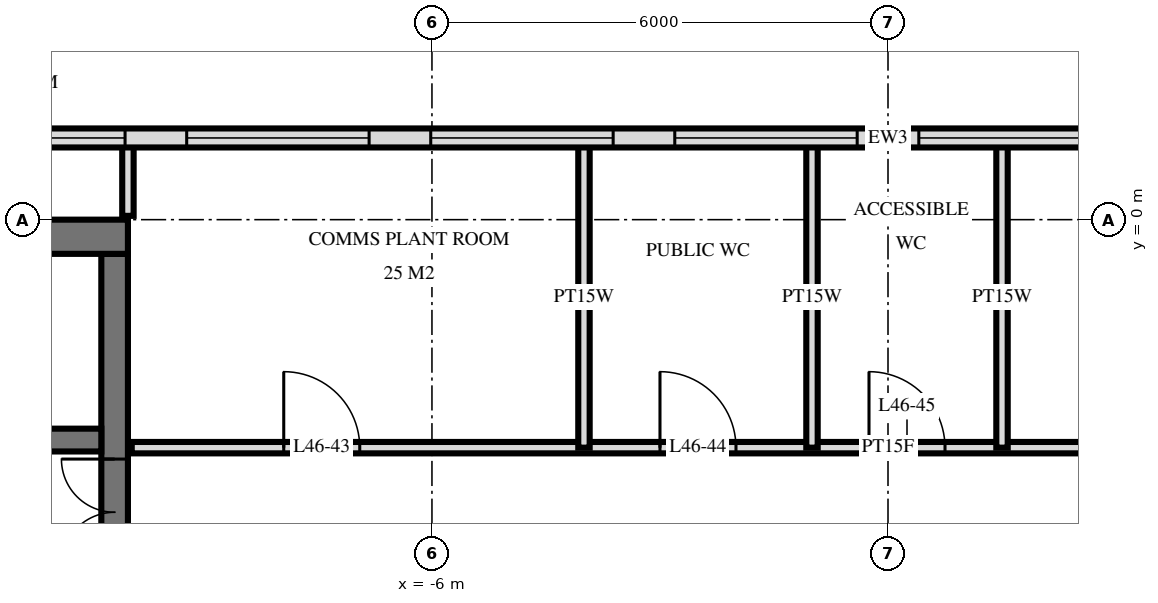
"""IFC4 building model, lengths in metres.
Left out: names, types, materials, properties, quantities, classifications, styles, units other than length and angle.
Written with IfcOpenShell. Run it as: python <this file> out.ifc"""

import sys

from ifc_helpers import new_model, si_unit, direction, frame, frame_2d, origin, place, context, subcontext, project, spatial, rectangle, extrude, element, fill, save


model = new_model("IFC4")
c1 = context("Model", 3, precision=1e-05, world=origin(), true_north=direction((0.0, 1.0)))
c2 = subcontext(c1, "Body", "Model", "MODEL_VIEW")
j1 = project(units=[si_unit("LENGTHUNIT", "METRE"), si_unit("PLANEANGLEUNIT", "RADIAN")], contexts=[c1])
p1 = place(None, origin())
s1 = spatial("IfcSite", under=j1, at=p1, CompositionType="ELEMENT")
p2 = place(p1, origin())
s2 = spatial("IfcBuilding", under=s1, at=p2, CompositionType="ELEMENT")
p3 = place(p2, frame((0.0, 0.0, 177.6)))
s3 = spatial("IfcBuildingStorey", under=s2, at=p3, CompositionType="ELEMENT", Elevation=177.6)
p4 = place(p3, frame((-24.5, -0.225, 0.0), z_axis=(0.0, 0.0, 1.0), x_axis=(1.0, 0.0, 0.0)))
e1 = element("IfcWall", 1, at=p4, inside=s3, PredefinedType="SHEAR", context=c2, shape_type="SweptSolid", body=[
    extrude(rectangle(XDim=14.5, YDim=0.45, at=frame_2d((7.25, 0.0))), origin(), (0.0, 0.0, 1.0), 6.0),
])
p5 = place(p3, frame((-10.175, -14.55, 0.0), z_axis=(0.0, 0.0, 1.0), x_axis=(0.0, 1.0, 0.0)))
e2 = element("IfcWall", 2, at=p5, inside=s3, PredefinedType="SHEAR", context=c2, shape_type="SweptSolid", body=[
    extrude(rectangle(XDim=14.1, YDim=0.35, at=frame_2d((7.05, 0.0))), origin(), (0.0, 0.0, 1.0), 6.0),
])
p6 = place(p5, frame((8.4, 0.0, 0.0)))
e3 = element("IfcOpeningElement", 3, at=p6, cuts=e2, PredefinedType="OPENING", context=c2, shape_type="SweptSolid", body=[
    extrude(rectangle(XDim=1.4, YDim=2.4, at=frame_2d((0.7, 1.2))), frame((0.0, 0.185, 0.0), z_axis=(0.0, -1.0, 0.0), x_axis=(1.0, 0.0, 0.0)), (0.0, 0.0, 1.0), 0.37),
])
p7 = place(p5, frame((10.0, 0.0, 0.0)))
e4 = element("IfcOpeningElement", 4, at=p7, cuts=e2, PredefinedType="OPENING", context=c2, shape_type="SweptSolid", body=[
    extrude(rectangle(XDim=1.4, YDim=2.4, at=frame_2d((0.7, 1.2))), frame((0.0, 0.185, 0.0), z_axis=(0.0, -1.0, 0.0), x_axis=(1.0, 0.0, 0.0)), (0.0, 0.0, 1.0), 0.37),
])
p8 = place(p5, frame((4.0, 0.0, 0.0)))
e5 = element("IfcOpeningElement", 5, at=p8, cuts=e2, PredefinedType="OPENING", context=c2, shape_type="SweptSolid", body=[
    extrude(rectangle(XDim=1.2, YDim=2.1, at=frame_2d((0.6, 1.05))), frame((0.0, 0.185, 0.0), z_axis=(0.0, -1.0, 0.0), x_axis=(1.0, 0.0, 0.0)), (0.0, 0.0, 1.0), 0.37),
])
p9 = place(p3, frame((-24.05, -2.9, 0.0), z_axis=(0.0, 0.0, 1.0), x_axis=(1.0, 0.0, 0.0)))
e6 = element("IfcWall", 6, at=p9, inside=s3, PredefinedType="SHEAR", context=c2, shape_type="SweptSolid", body=[
    extrude(rectangle(XDim=13.7, YDim=0.3, at=frame_2d((6.85, 0.0))), origin(), (0.0, 0.0, 1.0), 6.0),
])
p10 = place(p9, frame((0.55, 0.0, 0.0)))
e7 = element("IfcOpeningElement", 7, at=p10, cuts=e6, PredefinedType="OPENING", context=c2, shape_type="SweptSolid", body=[
    extrude(rectangle(XDim=1.1, YDim=2.1, at=frame_2d((0.55, 1.05))), frame((0.0, 0.16, 0.0), z_axis=(0.0, -1.0, 0.0), x_axis=(1.0, 0.0, 0.0)), (0.0, 0.0, 1.0), 0.32),
])
p11 = place(p9, frame((5.9, 0.0, 0.0)))
e8 = element("IfcOpeningElement", 8, at=p11, cuts=e6, PredefinedType="OPENING", context=c2, shape_type="SweptSolid", body=[
    extrude(rectangle(XDim=0.9, YDim=2.1, at=frame_2d((0.45, 1.05))), frame((0.0, 0.16, 0.0), z_axis=(0.0, -1.0, 0.0), x_axis=(1.0, 0.0, 0.0)), (0.0, 0.0, 1.0), 0.32),
])
p12 = place(p9, frame((11.85, 0.0, 0.0)))
e9 = element("IfcOpeningElement", 9, at=p12, cuts=e6, PredefinedType="OPENING", context=c2, shape_type="SweptSolid", body=[
    extrude(rectangle(XDim=1.0, YDim=2.1, at=frame_2d((0.5, 1.05))), frame((0.0, 0.16, 0.0), z_axis=(0.0, -1.0, 0.0), x_axis=(1.0, 0.0, 0.0)), (0.0, 0.0, 1.0), 0.32),
])
p13 = place(p9, frame((9.312, 0.0, 0.0)))
e10 = element("IfcOpeningElement", 10, at=p13, cuts=e6, PredefinedType="OPENING", context=c2, shape_type="SweptSolid", body=[
    extrude(rectangle(XDim=1.0, YDim=2.1, at=frame_2d((0.5, 1.05))), frame((0.0, 0.16, 0.0), z_axis=(0.0, -1.0, 0.0), x_axis=(1.0, 0.0, 0.0)), (0.0, 0.0, 1.0), 0.32),
])
p14 = place(p9, frame((7.887, 0.0, 0.0)))
e11 = element("IfcOpeningElement", 11, at=p14, cuts=e6, PredefinedType="OPENING", context=c2, shape_type="SweptSolid", body=[
    extrude(rectangle(XDim=1.0, YDim=2.1, at=frame_2d((0.5, 1.05))), frame((0.0, 0.16, 0.0), z_axis=(0.0, -1.0, 0.0), x_axis=(1.0, 0.0, 0.0)), (0.0, 0.0, 1.0), 0.32),
])
p15 = place(p9, frame((3.0, 0.0, 0.0)))
e12 = element("IfcOpeningElement", 12, at=p15, cuts=e6, PredefinedType="OPENING", context=c2, shape_type="SweptSolid", body=[
    extrude(rectangle(XDim=1.0, YDim=2.1, at=frame_2d((0.5, 1.05))), frame((0.0, 0.16, 0.0), z_axis=(0.0, -1.0, 0.0), x_axis=(1.0, 0.0, 0.0)), (0.0, 0.0, 1.0), 0.32),
])
p16 = place(p3, frame((22.475, 1.075, 0.0), z_axis=(0.0, 0.0, 1.0), x_axis=(-1.0, 0.0, 0.0)))
e13 = element("IfcWall", 13, at=p16, inside=s3, PredefinedType="SOLIDWALL", context=c2, shape_type="SweptSolid", body=[
    extrude(rectangle(XDim=44.951, YDim=0.25, at=frame_2d((22.475, 0.0))), origin(), (0.0, 0.0, 1.0), 5.72),
])
p17 = place(p16, frame((0.406, 0.0, 0.858)))
e14 = element("IfcOpeningElement", 14, at=p17, cuts=e13, PredefinedType="OPENING", context=c2, shape_type="SweptSolid", body=[
    extrude(rectangle(XDim=2.4, YDim=3.6, at=frame_2d((1.2, 1.8))), frame((0.0, 0.135, 0.0), z_axis=(0.0, -1.0, 0.0), x_axis=(1.0, 0.0, 0.0)), (0.0, 0.0, 1.0), 0.27),
])
p18 = place(p16, frame((3.616, 0.0, 0.858)))
e15 = element("IfcOpeningElement", 15, at=p18, cuts=e13, PredefinedType="OPENING", context=c2, shape_type="SweptSolid", body=[
    extrude(rectangle(XDim=2.4, YDim=3.6, at=frame_2d((1.2, 1.8))), frame((0.0, 0.135, 0.0), z_axis=(0.0, -1.0, 0.0), x_axis=(1.0, 0.0, 0.0)), (0.0, 0.0, 1.0), 0.27),
])
p19 = place(p16, frame((6.827, 0.0, 0.858)))
e16 = element("IfcOpeningElement", 16, at=p19, cuts=e13, PredefinedType="OPENING", context=c2, shape_type="SweptSolid", body=[
    extrude(rectangle(XDim=2.4, YDim=3.6, at=frame_2d((1.2, 1.8))), frame((0.0, 0.135, 0.0), z_axis=(0.0, -1.0, 0.0), x_axis=(1.0, 0.0, 0.0)), (0.0, 0.0, 1.0), 0.27),
])
p20 = place(p16, frame((10.038, 0.0, 0.858)))
e17 = element("IfcOpeningElement", 17, at=p20, cuts=e13, PredefinedType="OPENING", context=c2, shape_type="SweptSolid", body=[
    extrude(rectangle(XDim=2.4, YDim=3.6, at=frame_2d((1.2, 1.8))), frame((0.0, 0.135, 0.0), z_axis=(0.0, -1.0, 0.0), x_axis=(1.0, 0.0, 0.0)), (0.0, 0.0, 1.0), 0.27),
])
p21 = place(p16, frame((13.249, 0.0, 0.858)))
e18 = element("IfcOpeningElement", 18, at=p21, cuts=e13, PredefinedType="OPENING", context=c2, shape_type="SweptSolid", body=[
    extrude(rectangle(XDim=2.4, YDim=3.6, at=frame_2d((1.2, 1.8))), frame((0.0, 0.135, 0.0), z_axis=(0.0, -1.0, 0.0), x_axis=(1.0, 0.0, 0.0)), (0.0, 0.0, 1.0), 0.27),
])
p22 = place(p16, frame((16.459, 0.0, 0.858)))
e19 = element("IfcOpeningElement", 19, at=p22, cuts=e13, PredefinedType="OPENING", context=c2, shape_type="SweptSolid", body=[
    extrude(rectangle(XDim=2.4, YDim=3.6, at=frame_2d((1.2, 1.8))), frame((0.0, 0.135, 0.0), z_axis=(0.0, -1.0, 0.0), x_axis=(1.0, 0.0, 0.0)), (0.0, 0.0, 1.0), 0.27),
])
p23 = place(p16, frame((19.67, 0.0, 0.858)))
e20 = element("IfcOpeningElement", 20, at=p23, cuts=e13, PredefinedType="OPENING", context=c2, shape_type="SweptSolid", body=[
    extrude(rectangle(XDim=2.4, YDim=3.6, at=frame_2d((1.2, 1.8))), frame((0.0, 0.135, 0.0), z_axis=(0.0, -1.0, 0.0), x_axis=(1.0, 0.0, 0.0)), (0.0, 0.0, 1.0), 0.27),
])
p24 = place(p16, frame((22.881, 0.0, 0.858)))
e21 = element("IfcOpeningElement", 21, at=p24, cuts=e13, PredefinedType="OPENING", context=c2, shape_type="SweptSolid", body=[
    extrude(rectangle(XDim=2.4, YDim=3.6, at=frame_2d((1.2, 1.8))), frame((0.0, 0.135, 0.0), z_axis=(0.0, -1.0, 0.0), x_axis=(1.0, 0.0, 0.0)), (0.0, 0.0, 1.0), 0.27),
])
p25 = place(p16, frame((26.092, 0.0, 0.858)))
e22 = element("IfcOpeningElement", 22, at=p25, cuts=e13, PredefinedType="OPENING", context=c2, shape_type="SweptSolid", body=[
    extrude(rectangle(XDim=2.4, YDim=3.6, at=frame_2d((1.2, 1.8))), frame((0.0, 0.135, 0.0), z_axis=(0.0, -1.0, 0.0), x_axis=(1.0, 0.0, 0.0)), (0.0, 0.0, 1.0), 0.27),
])
p26 = place(p16, frame((29.302, 0.0, 0.858)))
e23 = element("IfcOpeningElement", 23, at=p26, cuts=e13, PredefinedType="OPENING", context=c2, shape_type="SweptSolid", body=[
    extrude(rectangle(XDim=2.4, YDim=3.6, at=frame_2d((1.2, 1.8))), frame((0.0, 0.135, 0.0), z_axis=(0.0, -1.0, 0.0), x_axis=(1.0, 0.0, 0.0)), (0.0, 0.0, 1.0), 0.27),
])
p27 = place(p16, frame((32.513, 0.0, 0.858)))
e24 = element("IfcOpeningElement", 24, at=p27, cuts=e13, PredefinedType="OPENING", context=c2, shape_type="SweptSolid", body=[
    extrude(rectangle(XDim=2.4, YDim=3.6, at=frame_2d((1.2, 1.8))), frame((0.0, 0.135, 0.0), z_axis=(0.0, -1.0, 0.0), x_axis=(1.0, 0.0, 0.0)), (0.0, 0.0, 1.0), 0.27),
])
p28 = place(p16, frame((35.724, 0.0, 0.858)))
e25 = element("IfcOpeningElement", 25, at=p28, cuts=e13, PredefinedType="OPENING", context=c2, shape_type="SweptSolid", body=[
    extrude(rectangle(XDim=2.4, YDim=3.6, at=frame_2d((1.2, 1.8))), frame((0.0, 0.135, 0.0), z_axis=(0.0, -1.0, 0.0), x_axis=(1.0, 0.0, 0.0)), (0.0, 0.0, 1.0), 0.27),
])
p29 = place(p16, frame((38.935, 0.0, 0.858)))
e26 = element("IfcOpeningElement", 26, at=p29, cuts=e13, PredefinedType="OPENING", context=c2, shape_type="SweptSolid", body=[
    extrude(rectangle(XDim=2.4, YDim=3.6, at=frame_2d((1.2, 1.8))), frame((0.0, 0.135, 0.0), z_axis=(0.0, -1.0, 0.0), x_axis=(1.0, 0.0, 0.0)), (0.0, 0.0, 1.0), 0.27),
])
p30 = place(p16, frame((42.146, 0.0, 0.858)))
e27 = element("IfcOpeningElement", 27, at=p30, cuts=e13, PredefinedType="OPENING", context=c2, shape_type="SweptSolid", body=[
    extrude(rectangle(XDim=2.4, YDim=3.6, at=frame_2d((1.2, 1.8))), frame((0.0, 0.135, 0.0), z_axis=(0.0, -1.0, 0.0), x_axis=(1.0, 0.0, 0.0)), (0.0, 0.0, 1.0), 0.27),
])
for number, where, z_axis, x_axis in (
    (28, (1.5, -3.0, 0.0), (0.0, 0.0, 1.0), (0.0, 1.0, 0.0)),
    (29, (-1.0, -3.0, 0.0), (0.0, 0.0, 1.0), (0.0, 1.0, 0.0)),
    (30, (-4.0, -3.0, 0.0), (0.0, 0.0, 1.0), (0.0, 1.0, 0.0)),
):
    element("IfcWall", number, at=place(p3, frame(where, z_axis=z_axis, x_axis=x_axis)), inside=s3, PredefinedType="PLUMBINGWALL", context=c2, shape_type="SweptSolid", body=[
        extrude(rectangle(XDim=3.96, YDim=0.15, at=frame_2d((1.98, 0.0))), origin(), (0.0, 0.0, 1.0), 5.7),
    ])
p31 = place(p3, frame((-10.0, 0.05, 0.0), z_axis=(0.0, 0.0, 1.0), x_axis=(0.0, 1.0, 0.0)))
e31 = element("IfcWall", 31, at=p31, inside=s3, PredefinedType="PARTITIONING", context=c2, shape_type="SweptSolid", body=[
    extrude(rectangle(XDim=0.91, YDim=0.15, at=frame_2d((0.455, 0.0))), origin(), (0.0, 0.0, 1.0), 5.7),
])
p32 = place(p3, frame((-9.95, -3.0, 0.0), z_axis=(0.0, 0.0, 1.0), x_axis=(1.0, 0.0, 0.0)))
e32 = element("IfcWall", 32, at=p32, inside=s3, PredefinedType="PARTITIONING", context=c2, shape_type="SweptSolid", body=[
    extrude(rectangle(XDim=19.9, YDim=0.15, at=frame_2d((9.95, 0.0))), origin(), (0.0, 0.0, 1.0), 5.7),
])
p33 = place(p32, frame((2.0, 0.0, 0.0)))
e33 = element("IfcOpeningElement", 33, at=p33, cuts=e32, PredefinedType="OPENING", context=c2, shape_type="SweptSolid", body=[
    extrude(rectangle(XDim=1.0, YDim=2.1, at=frame_2d((0.5, 1.05))), frame((0.0, 0.085, 0.0), z_axis=(0.0, -1.0, 0.0), x_axis=(1.0, 0.0, 0.0)), (0.0, 0.0, 1.0), 0.17),
])
p34 = place(p32, frame((6.95, 0.0, 0.0)))
e34 = element("IfcOpeningElement", 34, at=p34, cuts=e32, PredefinedType="OPENING", context=c2, shape_type="SweptSolid", body=[
    extrude(rectangle(XDim=1.0, YDim=2.1, at=frame_2d((0.5, 1.05))), frame((0.0, 0.085, 0.0), z_axis=(0.0, -1.0, 0.0), x_axis=(1.0, 0.0, 0.0)), (0.0, 0.0, 1.0), 0.17),
])
p35 = place(p32, frame((9.7, 0.0, 0.0)))
e35 = element("IfcOpeningElement", 35, at=p35, cuts=e32, PredefinedType="OPENING", context=c2, shape_type="SweptSolid", body=[
    extrude(rectangle(XDim=1.0, YDim=2.1, at=frame_2d((0.5, 1.05))), frame((0.0, 0.085, 0.0), z_axis=(0.0, -1.0, 0.0), x_axis=(1.0, 0.0, 0.0)), (0.0, 0.0, 1.0), 0.17),
])
p36 = place(p32, frame((16.9, 0.0, 0.0)))
e36 = element("IfcOpeningElement", 36, at=p36, cuts=e32, PredefinedType="OPENING", context=c2, shape_type="SweptSolid", body=[
    extrude(rectangle(XDim=1.0, YDim=2.1, at=frame_2d((0.5, 1.05))), frame((0.0, 0.085, 0.0), z_axis=(0.0, -1.0, 0.0), x_axis=(1.0, 0.0, 0.0)), (0.0, 0.0, 1.0), 0.17),
])
p37 = place(p23, origin())
e37 = element("IfcWindow", 37, at=p37, inside=s3, PartitioningType="SINGLE_PANEL", PredefinedType="USERDEFINED", context=c2, shape_type="SweptSolid", body=[
    extrude(rectangle(XDim=2.4, YDim=3.6, at=frame_2d((1.2, 1.8))), frame((0.0, 0.03, 0.0), z_axis=(0.0, -1.0, 0.0), x_axis=(1.0, 0.0, 0.0)), (0.0, 0.0, 1.0), 0.06),
])
fill(e20, e37)
p38 = place(p24, origin())
e38 = element("IfcWindow", 38, at=p38, inside=s3, PartitioningType="SINGLE_PANEL", PredefinedType="USERDEFINED", context=c2, shape_type="SweptSolid", body=[
    extrude(rectangle(XDim=2.4, YDim=3.6, at=frame_2d((1.2, 1.8))), frame((0.0, 0.03, 0.0), z_axis=(0.0, -1.0, 0.0), x_axis=(1.0, 0.0, 0.0)), (0.0, 0.0, 1.0), 0.06),
])
fill(e21, e38)
p39 = place(p25, origin())
e39 = element("IfcWindow", 39, at=p39, inside=s3, PartitioningType="SINGLE_PANEL", PredefinedType="USERDEFINED", context=c2, shape_type="SweptSolid", body=[
    extrude(rectangle(XDim=2.4, YDim=3.6, at=frame_2d((1.2, 1.8))), frame((0.0, 0.03, 0.0), z_axis=(0.0, -1.0, 0.0), x_axis=(1.0, 0.0, 0.0)), (0.0, 0.0, 1.0), 0.06),
])
fill(e22, e39)
p40 = place(p26, origin())
e40 = element("IfcWindow", 40, at=p40, inside=s3, PartitioningType="SINGLE_PANEL", PredefinedType="USERDEFINED", context=c2, shape_type="SweptSolid", body=[
    extrude(rectangle(XDim=2.4, YDim=3.6, at=frame_2d((1.2, 1.8))), frame((0.0, 0.03, 0.0), z_axis=(0.0, -1.0, 0.0), x_axis=(1.0, 0.0, 0.0)), (0.0, 0.0, 1.0), 0.06),
])
fill(e23, e40)
p41 = place(p27, origin())
e41 = element("IfcWindow", 41, at=p41, inside=s3, PartitioningType="SINGLE_PANEL", PredefinedType="USERDEFINED", context=c2, shape_type="SweptSolid", body=[
    extrude(rectangle(XDim=2.4, YDim=3.6, at=frame_2d((1.2, 1.8))), frame((0.0, 0.03, 0.0), z_axis=(0.0, -1.0, 0.0), x_axis=(1.0, 0.0, 0.0)), (0.0, 0.0, 1.0), 0.06),
])
fill(e24, e41)
p42 = place(p7, origin())
e42 = element("IfcDoor", 42, at=p42, inside=s3, OperationType="DOUBLE_DOOR_SINGLE_SWING", PredefinedType="DOOR", context=c2, shape_type="SweptSolid", body=[
    extrude(rectangle(XDim=1.4, YDim=2.4, at=frame_2d((0.7, 1.2))), frame((0.0, 0.025, 0.0), z_axis=(0.0, -1.0, 0.0), x_axis=(1.0, 0.0, 0.0)), (0.0, 0.0, 1.0), 0.05),
])
fill(e4, e42)
p43 = place(p33, origin())
e43 = element("IfcDoor", 43, at=p43, inside=s3, OperationType="SINGLE_SWING_RIGHT", PredefinedType="DOOR", context=c2, shape_type="SweptSolid", body=[
    extrude(rectangle(XDim=1.0, YDim=2.1, at=frame_2d((0.5, 1.05))), frame((0.0, 0.025, 0.0), z_axis=(0.0, -1.0, 0.0), x_axis=(1.0, 0.0, 0.0)), (0.0, 0.0, 1.0), 0.05),
])
fill(e33, e43)
p44 = place(p34, origin())
e44 = element("IfcDoor", 44, at=p44, inside=s3, OperationType="SINGLE_SWING_RIGHT", PredefinedType="DOOR", context=c2, shape_type="SweptSolid", body=[
    extrude(rectangle(XDim=1.0, YDim=2.1, at=frame_2d((0.5, 1.05))), frame((0.0, 0.025, 0.0), z_axis=(0.0, -1.0, 0.0), x_axis=(1.0, 0.0, 0.0)), (0.0, 0.0, 1.0), 0.05),
])
fill(e34, e44)
p45 = place(p35, origin())
e45 = element("IfcDoor", 45, at=p45, inside=s3, OperationType="SINGLE_SWING_RIGHT", PredefinedType="DOOR", context=c2, shape_type="SweptSolid", body=[
    extrude(rectangle(XDim=1.0, YDim=2.1, at=frame_2d((0.5, 1.05))), frame((0.0, 0.025, 0.0), z_axis=(0.0, -1.0, 0.0), x_axis=(1.0, 0.0, 0.0)), (0.0, 0.0, 1.0), 0.05),
])
fill(e35, e45)
save(model, sys.argv[1])
